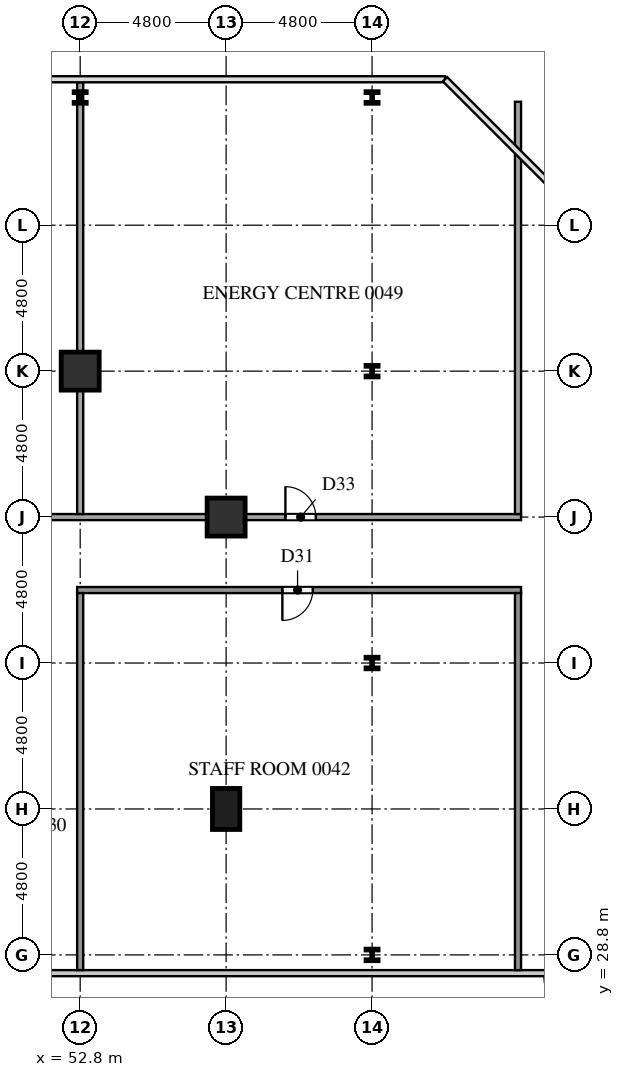
"""IFC4 building model, lengths in metres.
Left out: names, types, materials, properties, quantities, classifications, styles, units other than length and angle.
Written with IfcOpenShell. Run it as: python <this file> out.ifc"""

import sys

from ifc_helpers import new_model, si_unit, direction, frame, frame_2d, origin, origin_2d, place, context, subcontext, project, spatial, rectangle, i_section, extrude, element, fill, save


model = new_model("IFC4")
c1 = context("Model", 3, precision=1e-05, world=origin(), true_north=direction((0.0, 1.0)))
c2 = subcontext(c1, "Body", "Model", "MODEL_VIEW")
j1 = project(units=[si_unit("LENGTHUNIT", "METRE"), si_unit("PLANEANGLEUNIT", "RADIAN")], contexts=[c1])
p1 = place(None, origin())
s1 = spatial("IfcSite", under=j1, at=p1, CompositionType="ELEMENT")
p2 = place(p1, origin())
s2 = spatial("IfcBuilding", under=s1, at=p2, CompositionType="ELEMENT")
p3 = place(p2, origin())
s3 = spatial("IfcBuildingStorey", under=s2, at=p3, CompositionType="ELEMENT", Elevation=0.0)
p4 = place(p3, frame((57.6, 33.6, 0.0), z_axis=(0.0, 0.0, 1.0), x_axis=(0.0, 1.0, 0.0)))
e1 = element("IfcColumn", 1, at=p4, inside=s3, PredefinedType="COLUMN", context=c2, shape_type="SweptSolid", body=[
    extrude(rectangle(XDim=1.35, YDim=0.9, at=origin_2d()), origin(), (0.0, 0.0, 1.0), 5.7),
])
for number, where, z_axis, x_axis in (
    (2, (57.6, 43.2, 0.0), (0.0, 0.0, 1.0), (1.0, 0.0, 0.0)),
    (3, (52.8, 48.0, 0.0), (0.0, 0.0, 1.0), (1.0, 0.0, 0.0)),
):
    element("IfcColumn", number, at=place(p3, frame(where, z_axis=z_axis, x_axis=x_axis)), inside=s3, PredefinedType="COLUMN", context=c2, shape_type="SweptSolid", body=[
        extrude(rectangle(XDim=1.25, YDim=1.25, at=origin_2d()), origin(), (0.0, 0.0, 1.0), 5.7),
    ])
for number, where, z_axis, x_axis in (
    (4, (52.8, 57.0, 0.0), (0.0, 0.0, 1.0), (1.0, 0.0, 0.0)),
    (5, (62.4, 28.8, 0.0), (0.0, 0.0, 1.0), (1.0, 0.0, 0.0)),
    (6, (62.4, 38.4, 0.0), (0.0, 0.0, 1.0), (1.0, 0.0, 0.0)),
    (7, (62.4, 48.0, 0.0), (0.0, 0.0, 1.0), (1.0, 0.0, 0.0)),
    (8, (62.4, 57.0, 0.0), (0.0, 0.0, 1.0), (1.0, 0.0, 0.0)),
):
    element("IfcColumn", number, at=place(p3, frame(where, z_axis=z_axis, x_axis=x_axis)), inside=s3, PredefinedType="COLUMN", context=c2, shape_type="SweptSolid", body=[
        extrude(i_section(OverallWidth=0.396, OverallDepth=0.381, WebThickness=0.019, FlangeThickness=0.03, at=origin_2d()), origin(), (0.0, 0.0, 1.0), 5.7),
    ])
p5 = place(p3, frame((47.4, 28.2, 0.0), z_axis=(0.0, 0.0, 1.0), x_axis=(1.0, 0.0, 0.0)))
e9 = element("IfcWall", 9, at=p5, inside=s3, PredefinedType="PARTITIONING", context=c2, shape_type="SweptSolid", body=[
    extrude(rectangle(XDim=21.9, YDim=0.2, at=frame_2d((10.95, 0.0))), origin(), (0.0, 0.0, 1.0), 5.7),
])
p6 = place(p3, frame((67.3, 40.8, 0.0), z_axis=(0.0, 0.0, 1.0), x_axis=(-1.0, 0.0, 0.0)))
e10 = element("IfcWall", 10, at=p6, inside=s3, PredefinedType="PARTITIONING", context=c2, shape_type="SweptSolid", body=[
    extrude(rectangle(XDim=14.6, YDim=0.2, at=frame_2d((7.3, 0.0))), origin(), (0.0, 0.0, 1.0), 5.7),
])
p7 = place(p6, frame((6.85, 0.0, 0.0)))
e11 = element("IfcOpeningElement", 11, at=p7, cuts=e10, PredefinedType="OPENING", context=c2, shape_type="SweptSolid", body=[
    extrude(rectangle(XDim=1.0, YDim=2.1, at=frame_2d((0.5, 1.05))), frame((0.0, 0.11, 0.0), z_axis=(0.0, -1.0, 0.0), x_axis=(1.0, 0.0, 0.0)), (0.0, 0.0, 1.0), 0.22),
])
p8 = place(p3, frame((43.2, 43.2, 0.0), z_axis=(0.0, 0.0, 1.0), x_axis=(1.0, 0.0, 0.0)))
e12 = element("IfcWall", 12, at=p8, inside=s3, PredefinedType="PARTITIONING", context=c2, shape_type="SweptSolid", body=[
    extrude(rectangle(XDim=24.1, YDim=0.2, at=frame_2d((12.05, 0.0))), origin(), (0.0, 0.0, 1.0), 5.7),
])
p9 = place(p8, frame((4.25, 0.0, 0.0)))
e13 = element("IfcOpeningElement", 13, at=p9, cuts=e12, PredefinedType="OPENING", context=c2, shape_type="SweptSolid", body=[
    extrude(rectangle(XDim=1.0, YDim=2.1, at=frame_2d((0.5, 1.05))), frame((0.0, 0.11, 0.0), z_axis=(0.0, -1.0, 0.0), x_axis=(1.0, 0.0, 0.0)), (0.0, 0.0, 1.0), 0.22),
])
p10 = place(p8, frame((16.35, 0.0, 0.0)))
e14 = element("IfcOpeningElement", 14, at=p10, cuts=e12, PredefinedType="OPENING", context=c2, shape_type="SweptSolid", body=[
    extrude(rectangle(XDim=1.0, YDim=2.1, at=frame_2d((0.5, 1.05))), frame((0.0, 0.11, 0.0), z_axis=(0.0, -1.0, 0.0), x_axis=(1.0, 0.0, 0.0)), (0.0, 0.0, 1.0), 0.22),
])
p11 = place(p3, frame((52.8, 28.3, 0.0), z_axis=(0.0, 0.0, 1.0), x_axis=(0.0, 1.0, 0.0)))
e15 = element("IfcWall", 15, at=p11, inside=s3, PredefinedType="PARTITIONING", context=c2, shape_type="SweptSolid", body=[
    extrude(rectangle(XDim=12.4, YDim=0.2, at=frame_2d((6.2, 0.0))), origin(), (0.0, 0.0, 1.0), 5.7),
])
p12 = place(p3, frame((52.8, 43.3, 0.0), z_axis=(0.0, 0.0, 1.0), x_axis=(0.0, 1.0, 0.0)))
e16 = element("IfcWall", 16, at=p12, inside=s3, PredefinedType="PARTITIONING", context=c2, shape_type="SweptSolid", body=[
    extrude(rectangle(XDim=14.2, YDim=0.2, at=frame_2d((7.1, 0.0))), origin(), (0.0, 0.0, 1.0), 5.7),
])
p13 = place(p3, frame((67.2, 28.3, 0.0), z_axis=(0.0, 0.0, 1.0), x_axis=(0.0, 1.0, 0.0)))
e17 = element("IfcWall", 17, at=p13, inside=s3, PredefinedType="PARTITIONING", context=c2, shape_type="SweptSolid", body=[
    extrude(rectangle(XDim=12.4, YDim=0.2, at=frame_2d((6.2, 0.0))), origin(), (0.0, 0.0, 1.0), 5.7),
])
p14 = place(p3, frame((67.2, 43.3, 0.0), z_axis=(0.0, 0.0, 1.0), x_axis=(0.0, 1.0, 0.0)))
e18 = element("IfcWall", 18, at=p14, inside=s3, PredefinedType="PARTITIONING", context=c2, shape_type="SweptSolid", body=[
    extrude(rectangle(XDim=13.56, YDim=0.2, at=frame_2d((6.78, 0.0))), origin(), (0.0, 0.0, 1.0), 5.7),
])
p15 = place(p7, origin())
e19 = element("IfcDoor", 19, at=p15, inside=s3, OperationType="SINGLE_SWING_RIGHT", PredefinedType="DOOR", context=c2, shape_type="SweptSolid", body=[
    extrude(rectangle(XDim=1.0, YDim=2.1, at=frame_2d((0.5, 1.05))), frame((0.0, 0.025, 0.0), z_axis=(0.0, -1.0, 0.0), x_axis=(1.0, 0.0, 0.0)), (0.0, 0.0, 1.0), 0.05),
])
fill(e11, e19)
p16 = place(p10, origin())
e20 = element("IfcDoor", 20, at=p16, inside=s3, OperationType="SINGLE_SWING_LEFT", PredefinedType="DOOR", context=c2, shape_type="SweptSolid", body=[
    extrude(rectangle(XDim=1.0, YDim=2.1, at=frame_2d((0.5, 1.05))), frame((0.0, 0.025, 0.0), z_axis=(0.0, -1.0, 0.0), x_axis=(1.0, 0.0, 0.0)), (0.0, 0.0, 1.0), 0.05),
])
fill(e14, e20)
save(model, sys.argv[1])
